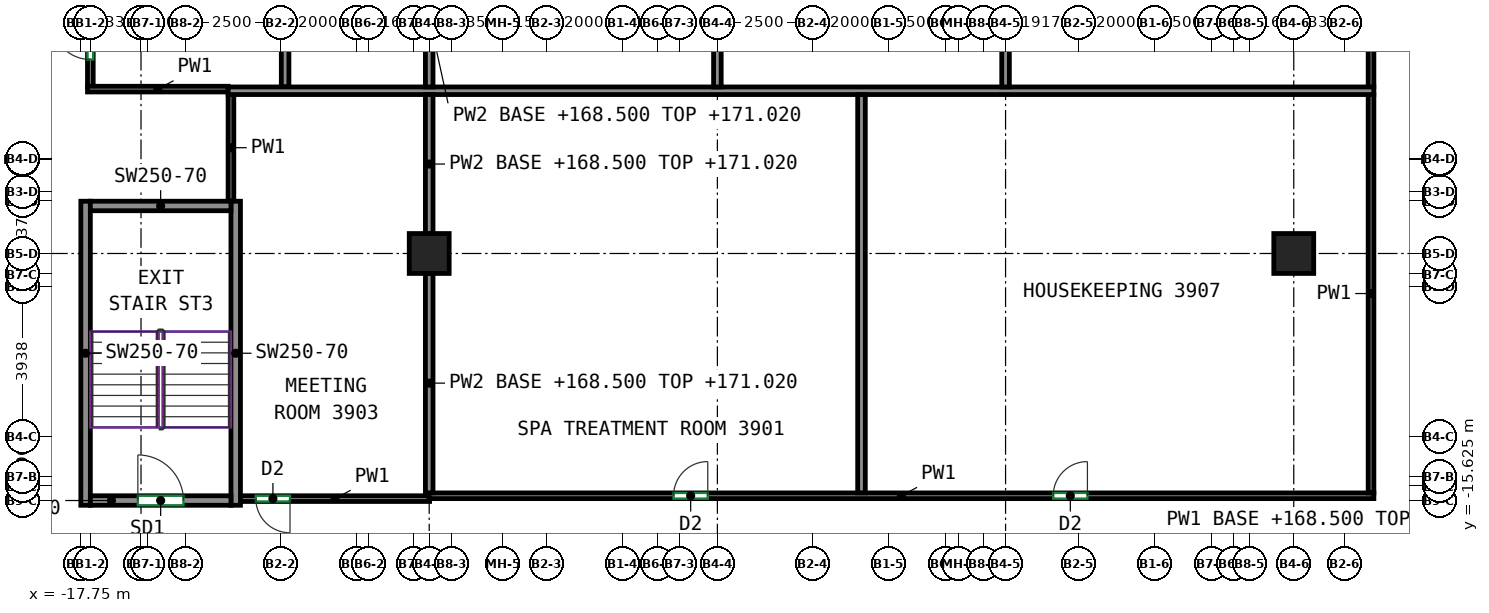
"""IFC4 building model, lengths in metres.
Left out: names, types, materials, properties, quantities, classifications, styles, units other than length and angle.
Written with IfcOpenShell. Run it as: python <this file> out.ifc"""

import sys

from ifc_helpers import new_model, si_unit, direction, frame, frame_2d, origin, origin_2d, place, context, subcontext, project, spatial, rectangle, extrude, source, transform, mapped, element, fill, save


model = new_model("IFC4")
c1 = context("Model", 3, precision=1e-05, world=origin(), true_north=direction((0.0, 1.0)))
c2 = subcontext(c1, "Body", "Model", "MODEL_VIEW")
j1 = project(units=[si_unit("LENGTHUNIT", "METRE"), si_unit("PLANEANGLEUNIT", "RADIAN")], contexts=[c1])
p1 = place(None, origin())
s1 = spatial("IfcSite", under=j1, at=p1, CompositionType="ELEMENT")
p2 = place(p1, origin())
s2 = spatial("IfcBuilding", under=s1, at=p2, CompositionType="ELEMENT")
p3 = place(p2, frame((0.0, 0.0, 168.5)))
s3 = spatial("IfcBuildingStorey", under=s2, at=p3, CompositionType="ELEMENT", Elevation=168.5)
m1 = source(origin(), c2, "Body", "SweptSolid", [
    extrude(rectangle(XDim=1.05, YDim=1.05, at=origin_2d()), origin(), (0.0, 0.0, 1.0), 3.12),
])
for number, where, z_axis, x_axis in (
    (1, (-8.583, -9.125, 0.0), (0.0, 0.0, 1.0), (1.0, 0.0, 0.0)),
    (2, (14.167, -9.125, 0.0), (0.0, 0.0, 1.0), (1.0, 0.0, 0.0)),
):
    element("IfcColumn", number, at=place(p3, frame(where, z_axis=z_axis, x_axis=x_axis)), inside=s3, PredefinedType="COLUMN", context=c2, shape_type="MappedRepresentation", body=[
        mapped(m1, transform((0.0, 0.0, 0.0))),
    ])
m2 = source(origin(), c2, "Body", "SweptSolid", [
    extrude(rectangle(XDim=8.0, YDim=0.25, at=frame_2d((4.0, 0.0))), origin(), (0.0, 0.0, 1.0), 3.12),
])
for number, where, z_axis, x_axis in (
    (3, (-17.625, -15.75, 0.0), (0.0, 0.0, 1.0), (0.0, 1.0, 0.0)),
    (4, (-13.675, -15.75, 0.0), (0.0, 0.0, 1.0), (0.0, 1.0, 0.0)),
):
    element("IfcWall", number, at=place(p3, frame(where, z_axis=z_axis, x_axis=x_axis)), inside=s3, PredefinedType="SHEAR", context=c2, shape_type="MappedRepresentation", body=[
        mapped(m2, transform((0.0, 0.0, 0.0))),
    ])
m3 = source(origin(), c2, "Body", "SweptSolid", [
    extrude(rectangle(XDim=3.7, YDim=0.25, at=frame_2d((1.85, 0.0))), origin(), (0.0, 0.0, 1.0), 3.12),
])
p4 = place(p3, frame((-17.5, -15.625, 0.0), z_axis=(0.0, 0.0, 1.0), x_axis=(1.0, 0.0, 0.0)))
e5 = element("IfcWall", 5, at=p4, inside=s3, PredefinedType="SHEAR", context=c2, shape_type="MappedRepresentation", body=[
    mapped(m3, transform((0.0, 0.0, 0.0))),
])
p5 = place(p4, frame((1.25, 0.0, 0.0)))
e6 = element("IfcOpeningElement", 6, at=p5, cuts=e5, PredefinedType="OPENING", context=c2, shape_type="SweptSolid", body=[
    extrude(rectangle(XDim=1.2, YDim=2.1, at=frame_2d((0.6, 1.05))), frame((0.0, 0.135, 0.0), z_axis=(0.0, -1.0, 0.0), x_axis=(1.0, 0.0, 0.0)), (0.0, 0.0, 1.0), 0.27),
])
p6 = place(p3, frame((-17.5, -7.875, 0.0), z_axis=(0.0, 0.0, 1.0), x_axis=(1.0, 0.0, 0.0)))
e7 = element("IfcWall", 7, at=p6, inside=s3, PredefinedType="SHEAR", context=c2, shape_type="MappedRepresentation", body=[
    mapped(m3, transform((0.0, 0.0, 0.0))),
])
p7 = place(p3, frame((-17.5, -4.725, 0.0), z_axis=(0.0, 0.0, 1.0), x_axis=(0.0, 1.0, 0.0)))
e8 = element("IfcWall", 8, at=p7, inside=s3, PredefinedType="PARTITIONING", context=c2, shape_type="SweptSolid", body=[
    extrude(rectangle(XDim=8.35, YDim=0.15, at=frame_2d((4.175, 0.0))), origin(), (0.0, 0.0, 1.0), 3.12),
])
p8 = place(p7, frame((0.704, 0.0, 0.0)))
e9 = element("IfcOpeningElement", 9, at=p8, cuts=e8, PredefinedType="OPENING", context=c2, shape_type="SweptSolid", body=[
    extrude(rectangle(XDim=1.0, YDim=2.1, at=frame_2d((0.5, 1.05))), frame((0.0, 0.085, 0.0), z_axis=(0.0, -1.0, 0.0), x_axis=(1.0, 0.0, 0.0)), (0.0, 0.0, 1.0), 0.17),
])
p9 = place(p3, frame((-17.575, -4.8, 0.0), z_axis=(0.0, 0.0, 1.0), x_axis=(1.0, 0.0, 0.0)))
e10 = element("IfcWall", 10, at=p9, inside=s3, PredefinedType="PARTITIONING", context=c2, shape_type="SweptSolid", body=[
    extrude(rectangle(XDim=3.702, YDim=0.15, at=frame_2d((1.851, 0.0))), origin(), (0.0, 0.0, 1.0), 3.12),
])
p10 = place(p3, frame((16.2, -4.753, 0.0), z_axis=(0.0, 0.0, 1.0), x_axis=(0.0, 1.0, 0.0)))
e11 = element("IfcWall", 11, at=p10, inside=s3, PredefinedType="PARTITIONING", context=c2, shape_type="SweptSolid", body=[
    extrude(rectangle(XDim=8.378, YDim=0.15, at=frame_2d((4.189, 0.0))), origin(), (0.0, 0.0, 1.0), 3.12),
])
p11 = place(p3, frame((-13.8, -7.75, 0.0), z_axis=(0.0, 0.0, 1.0), x_axis=(0.0, 1.0, 0.0)))
e12 = element("IfcWall", 12, at=p11, inside=s3, PredefinedType="PARTITIONING", context=c2, shape_type="SweptSolid", body=[
    extrude(rectangle(XDim=2.817, YDim=0.15, at=frame_2d((1.408, 0.0))), origin(), (0.0, 0.0, 1.0), 3.12),
])
p12 = place(p3, frame((-8.573, -15.575, 0.0), z_axis=(0.0, 0.0, 1.0), x_axis=(-1.0, 0.0, 0.0)))
e13 = element("IfcWall", 13, at=p12, inside=s3, PredefinedType="PARTITIONING", context=c2, shape_type="SweptSolid", body=[
    extrude(rectangle(XDim=4.977, YDim=0.15, at=frame_2d((2.489, 0.0))), origin(), (0.0, 0.0, 1.0), 3.12),
])
p13 = place(p12, frame((3.673, 0.0, 0.0)))
e14 = element("IfcOpeningElement", 14, at=p13, cuts=e13, PredefinedType="OPENING", context=c2, shape_type="SweptSolid", body=[
    extrude(rectangle(XDim=0.9, YDim=2.1, at=frame_2d((0.45, 1.05))), frame((0.0, 0.085, 0.0), z_axis=(0.0, -1.0, 0.0), x_axis=(1.0, 0.0, 0.0)), (0.0, 0.0, 1.0), 0.17),
])
p14 = place(p3, frame((-8.593, -15.5, 0.0), z_axis=(0.0, 0.0, 1.0), x_axis=(1.0, 0.0, 0.0)))
e15 = element("IfcWall", 15, at=p14, inside=s3, PredefinedType="PARTITIONING", context=c2, shape_type="SweptSolid", body=[
    extrude(rectangle(XDim=24.868, YDim=0.15, at=frame_2d((12.434, 0.0))), origin(), (0.0, 0.0, 1.0), 3.12),
])
p15 = place(p14, frame((6.44, 0.0, 0.0)))
e16 = element("IfcOpeningElement", 16, at=p15, cuts=e15, PredefinedType="OPENING", context=c2, shape_type="SweptSolid", body=[
    extrude(rectangle(XDim=0.9, YDim=2.1, at=frame_2d((0.45, 1.05))), frame((0.0, 0.085, 0.0), z_axis=(0.0, -1.0, 0.0), x_axis=(1.0, 0.0, 0.0)), (0.0, 0.0, 1.0), 0.17),
])
p16 = place(p14, frame((16.43, 0.0, 0.0)))
e17 = element("IfcOpeningElement", 17, at=p16, cuts=e15, PredefinedType="OPENING", context=c2, shape_type="SweptSolid", body=[
    extrude(rectangle(XDim=0.9, YDim=2.1, at=frame_2d((0.45, 1.05))), frame((0.0, 0.085, 0.0), z_axis=(0.0, -1.0, 0.0), x_axis=(1.0, 0.0, 0.0)), (0.0, 0.0, 1.0), 0.17),
])
p17 = place(p3, frame((16.2, -15.425, 0.0), z_axis=(0.0, 0.0, 1.0), x_axis=(0.0, 1.0, 0.0)))
e18 = element("IfcWall", 18, at=p17, inside=s3, PredefinedType="PARTITIONING", context=c2, shape_type="SweptSolid", body=[
    extrude(rectangle(XDim=10.492, YDim=0.15, at=frame_2d((5.246, 0.0))), origin(), (0.0, 0.0, 1.0), 3.12),
])
p18 = place(p3, frame((-12.375, -4.743, 0.0), z_axis=(0.0, 0.0, 1.0), x_axis=(0.0, 1.0, 0.0)))
e19 = element("IfcWall", 19, at=p18, inside=s3, PredefinedType="PARTITIONING", context=c2, shape_type="SweptSolid", body=[
    extrude(rectangle(XDim=8.366, YDim=0.2, at=frame_2d((4.183, 0.0))), origin(), (0.0, 0.0, 1.0), 3.12),
])
p19 = place(p3, frame((-13.873, -4.843, 0.0), z_axis=(0.0, 0.0, 1.0), x_axis=(1.0, 0.0, 0.0)))
e20 = element("IfcWall", 20, at=p19, inside=s3, PredefinedType="PARTITIONING", context=c2, shape_type="SweptSolid", body=[
    extrude(rectangle(XDim=30.146, YDim=0.2, at=frame_2d((15.073, 0.0))), origin(), (0.0, 0.0, 1.0), 3.12),
])
p20 = place(p3, frame((-8.583, -4.743, 0.0), z_axis=(0.0, 0.0, 1.0), x_axis=(0.0, 1.0, 0.0)))
e21 = element("IfcWall", 21, at=p20, inside=s3, PredefinedType="PARTITIONING", context=c2, shape_type="SweptSolid", body=[
    extrude(rectangle(XDim=3.656, YDim=0.2, at=frame_2d((1.828, 0.0))), origin(), (0.0, 0.0, 1.0), 2.52),
])
for number, where, z_axis, x_axis in (
    (22, (-1.0, -4.743, 0.0), (0.0, 0.0, 1.0), (0.0, 1.0, 0.0)),
    (23, (6.583, -4.743, 0.0), (0.0, 0.0, 1.0), (0.0, 1.0, 0.0)),
):
    element("IfcWall", number, at=place(p3, frame(where, z_axis=z_axis, x_axis=x_axis)), inside=s3, PredefinedType="PARTITIONING", context=c2, shape_type="SweptSolid", body=[
        extrude(rectangle(XDim=8.366, YDim=0.2, at=frame_2d((4.183, 0.0))), origin(), (0.0, 0.0, 1.0), 3.12),
    ])
p21 = place(p3, frame((-8.583, -8.6, 0.0), z_axis=(0.0, 0.0, 1.0), x_axis=(0.0, 1.0, 0.0)))
e24 = element("IfcWall", 24, at=p21, inside=s3, PredefinedType="PARTITIONING", context=c2, shape_type="SweptSolid", body=[
    extrude(rectangle(XDim=3.657, YDim=0.2, at=frame_2d((1.829, 0.0))), origin(), (0.0, 0.0, 1.0), 2.52),
])
p22 = place(p3, frame((-8.583, -15.423, 0.0), z_axis=(0.0, 0.0, 1.0), x_axis=(0.0, 1.0, 0.0)))
e25 = element("IfcWall", 25, at=p22, inside=s3, PredefinedType="PARTITIONING", context=c2, shape_type="SweptSolid", body=[
    extrude(rectangle(XDim=5.773, YDim=0.2, at=frame_2d((2.887, 0.0))), origin(), (0.0, 0.0, 1.0), 2.52),
])
p23 = place(p3, frame((2.792, -15.423, 0.0), z_axis=(0.0, 0.0, 1.0), x_axis=(0.0, 1.0, 0.0)))
e26 = element("IfcWall", 26, at=p23, inside=s3, PredefinedType="PARTITIONING", context=c2, shape_type="SweptSolid", body=[
    extrude(rectangle(XDim=10.48, YDim=0.2, at=frame_2d((5.24, 0.0))), origin(), (0.0, 0.0, 1.0), 3.12),
])
p24 = place(p5, origin())
e27 = element("IfcDoor", 27, at=p24, inside=s3, OperationType="DOUBLE_DOOR_SINGLE_SWING", PredefinedType="DOOR", context=c2, shape_type="SweptSolid", body=[
    extrude(rectangle(XDim=1.2, YDim=2.1, at=frame_2d((0.6, 1.05))), frame((0.0, 0.025, 0.0), z_axis=(0.0, -1.0, 0.0), x_axis=(1.0, 0.0, 0.0)), (0.0, 0.0, 1.0), 0.05),
])
fill(e6, e27)
p25 = place(p13, origin())
e28 = element("IfcDoor", 28, at=p25, inside=s3, OperationType="SINGLE_SWING_LEFT", PredefinedType="DOOR", context=c2, shape_type="SweptSolid", body=[
    extrude(rectangle(XDim=0.9, YDim=2.1, at=frame_2d((0.45, 1.05))), frame((0.0, 0.025, 0.0), z_axis=(0.0, -1.0, 0.0), x_axis=(1.0, 0.0, 0.0)), (0.0, 0.0, 1.0), 0.05),
])
fill(e14, e28)
p26 = place(p15, origin())
e29 = element("IfcDoor", 29, at=p26, inside=s3, OperationType="SINGLE_SWING_RIGHT", PredefinedType="DOOR", context=c2, shape_type="SweptSolid", body=[
    extrude(rectangle(XDim=0.9, YDim=2.1, at=frame_2d((0.45, 1.05))), frame((0.0, 0.025, 0.0), z_axis=(0.0, -1.0, 0.0), x_axis=(1.0, 0.0, 0.0)), (0.0, 0.0, 1.0), 0.05),
])
fill(e16, e29)
p27 = place(p16, origin())
e30 = element("IfcDoor", 30, at=p27, inside=s3, OperationType="SINGLE_SWING_RIGHT", PredefinedType="DOOR", context=c2, shape_type="SweptSolid", body=[
    extrude(rectangle(XDim=0.9, YDim=2.1, at=frame_2d((0.45, 1.05))), frame((0.0, 0.025, 0.0), z_axis=(0.0, -1.0, 0.0), x_axis=(1.0, 0.0, 0.0)), (0.0, 0.0, 1.0), 0.05),
])
fill(e17, e30)
p28 = place(p8, origin())
e31 = element("IfcDoor", 31, at=p28, inside=s3, OperationType="SINGLE_SWING_RIGHT", PredefinedType="DOOR", context=c2, shape_type="SweptSolid", body=[
    extrude(rectangle(XDim=1.0, YDim=2.1, at=frame_2d((0.5, 1.05))), frame((0.0, 0.025, 0.0), z_axis=(0.0, -1.0, 0.0), x_axis=(1.0, 0.0, 0.0)), (0.0, 0.0, 1.0), 0.05),
])
fill(e9, e31)
save(model, sys.argv[1])
